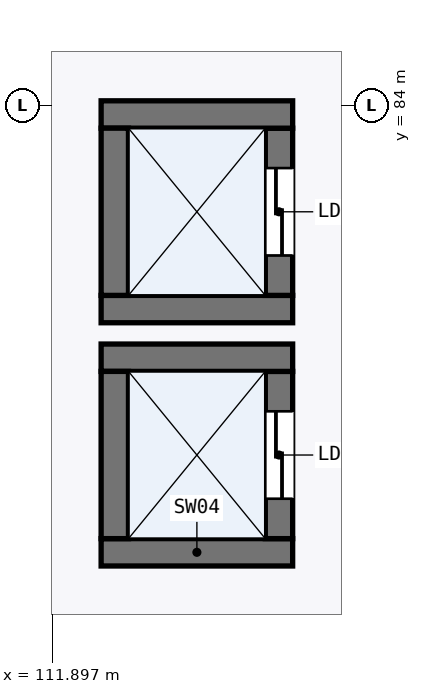
"""IFC4 building model, lengths in metres.
Left out: names, types, materials, properties, quantities, classifications, styles, units other than length and angle.
Written with IfcOpenShell. Run it as: python <this file> out.ifc"""

import sys

from ifc_helpers import new_model, si_unit, direction, frame, frame_2d, origin, place, context, subcontext, project, spatial, rectangle, extrude, element, fill, save


model = new_model("IFC4")
c1 = context("Model", 3, precision=1e-05, world=origin(), true_north=direction((0.0, 1.0)))
c2 = subcontext(c1, "Body", "Model", "MODEL_VIEW")
j1 = project(units=[si_unit("LENGTHUNIT", "METRE"), si_unit("PLANEANGLEUNIT", "RADIAN")], contexts=[c1])
p1 = place(None, origin())
s1 = spatial("IfcSite", under=j1, at=p1, CompositionType="ELEMENT")
p2 = place(p1, origin())
s2 = spatial("IfcBuilding", under=s1, at=p2, CompositionType="ELEMENT")
p3 = place(p2, frame((0.0, 0.0, 36.3)))
s3 = spatial("IfcBuildingStorey", under=s2, at=p3, CompositionType="ELEMENT", Elevation=36.3)
p4 = place(p3, frame((112.54, 78.12, 0.0), z_axis=(0.0, 0.0, 1.0), x_axis=(1.0, 0.0, 0.0)))
e1 = element("IfcWall", 1, at=p4, inside=s3, PredefinedType="SHEAR", context=c2, shape_type="SweptSolid", body=[
    extrude(rectangle(XDim=2.52, YDim=0.36, at=frame_2d((1.26, 0.0))), origin(), (0.0, 0.0, 1.0), 3.495),
])
p5 = place(p3, frame((114.88, 78.3, 0.0), z_axis=(0.0, 0.0, 1.0), x_axis=(0.0, 1.0, 0.0)))
e2 = element("IfcWall", 2, at=p5, inside=s3, PredefinedType="SHEAR", context=c2, shape_type="SweptSolid", body=[
    extrude(rectangle(XDim=2.2, YDim=0.36, at=frame_2d((1.1, 0.0))), origin(), (0.0, 0.0, 1.0), 3.495),
])
p6 = place(p5, frame((0.525, 0.0, 0.0)))
e3 = element("IfcOpeningElement", 3, at=p6, cuts=e2, PredefinedType="OPENING", context=c2, shape_type="SweptSolid", body=[
    extrude(rectangle(XDim=1.15, YDim=2.2, at=frame_2d((0.575, 1.1))), frame((0.0, 0.19, 0.0), z_axis=(0.0, -1.0, 0.0), x_axis=(1.0, 0.0, 0.0)), (0.0, 0.0, 1.0), 0.38),
])
p7 = place(p3, frame((115.06, 80.68, 0.0), z_axis=(0.0, 0.0, 1.0), x_axis=(-1.0, 0.0, 0.0)))
e4 = element("IfcWall", 4, at=p7, inside=s3, PredefinedType="SHEAR", context=c2, shape_type="SweptSolid", body=[
    extrude(rectangle(XDim=2.52, YDim=0.36, at=frame_2d((1.26, 0.0))), origin(), (0.0, 0.0, 1.0), 3.495),
])
p8 = place(p3, frame((112.72, 80.5, 0.0), z_axis=(0.0, 0.0, 1.0), x_axis=(0.0, -1.0, 0.0)))
e5 = element("IfcWall", 5, at=p8, inside=s3, PredefinedType="SHEAR", context=c2, shape_type="SweptSolid", body=[
    extrude(rectangle(XDim=2.2, YDim=0.36, at=frame_2d((1.1, 0.0))), origin(), (0.0, 0.0, 1.0), 3.495),
])
p9 = place(p3, frame((112.54, 81.32, 0.0), z_axis=(0.0, 0.0, 1.0), x_axis=(1.0, 0.0, 0.0)))
e6 = element("IfcWall", 6, at=p9, inside=s3, PredefinedType="SHEAR", context=c2, shape_type="SweptSolid", body=[
    extrude(rectangle(XDim=2.52, YDim=0.36, at=frame_2d((1.26, 0.0))), origin(), (0.0, 0.0, 1.0), 3.495),
])
p10 = place(p3, frame((114.88, 81.5, 0.0), z_axis=(0.0, 0.0, 1.0), x_axis=(0.0, 1.0, 0.0)))
e7 = element("IfcWall", 7, at=p10, inside=s3, PredefinedType="SHEAR", context=c2, shape_type="SweptSolid", body=[
    extrude(rectangle(XDim=2.2, YDim=0.36, at=frame_2d((1.1, 0.0))), origin(), (0.0, 0.0, 1.0), 3.495),
])
p11 = place(p10, frame((0.525, 0.0, 0.0)))
e8 = element("IfcOpeningElement", 8, at=p11, cuts=e7, PredefinedType="OPENING", context=c2, shape_type="SweptSolid", body=[
    extrude(rectangle(XDim=1.15, YDim=2.2, at=frame_2d((0.575, 1.1))), frame((0.0, 0.19, 0.0), z_axis=(0.0, -1.0, 0.0), x_axis=(1.0, 0.0, 0.0)), (0.0, 0.0, 1.0), 0.38),
])
p12 = place(p3, frame((115.06, 83.88, 0.0), z_axis=(0.0, 0.0, 1.0), x_axis=(-1.0, 0.0, 0.0)))
e9 = element("IfcWall", 9, at=p12, inside=s3, PredefinedType="SHEAR", context=c2, shape_type="SweptSolid", body=[
    extrude(rectangle(XDim=2.52, YDim=0.36, at=frame_2d((1.26, 0.0))), origin(), (0.0, 0.0, 1.0), 3.495),
])
p13 = place(p3, frame((112.72, 83.7, 0.0), z_axis=(0.0, 0.0, 1.0), x_axis=(0.0, -1.0, 0.0)))
e10 = element("IfcWall", 10, at=p13, inside=s3, PredefinedType="SHEAR", context=c2, shape_type="SweptSolid", body=[
    extrude(rectangle(XDim=2.2, YDim=0.36, at=frame_2d((1.1, 0.0))), origin(), (0.0, 0.0, 1.0), 3.495),
])
p14 = place(p6, frame((1.15, 0.0, 0.0), z_axis=(0.0, 0.0, 1.0), x_axis=(-1.0, 0.0, 0.0)))
e11 = element("IfcDoor", 11, at=p14, inside=s3, OperationType="DOUBLE_DOOR_SLIDING", PredefinedType="DOOR", context=c2, shape_type="SweptSolid", body=[
    extrude(rectangle(XDim=1.15, YDim=2.2, at=frame_2d((0.575, 1.1))), frame((0.0, 0.025, 0.0), z_axis=(0.0, -1.0, 0.0), x_axis=(1.0, 0.0, 0.0)), (0.0, 0.0, 1.0), 0.05),
])
fill(e3, e11)
p15 = place(p11, frame((1.15, 0.0, 0.0), z_axis=(0.0, 0.0, 1.0), x_axis=(-1.0, 0.0, 0.0)))
e12 = element("IfcDoor", 12, at=p15, inside=s3, OperationType="DOUBLE_DOOR_SLIDING", PredefinedType="DOOR", context=c2, shape_type="SweptSolid", body=[
    extrude(rectangle(XDim=1.15, YDim=2.2, at=frame_2d((0.575, 1.1))), frame((0.0, 0.025, 0.0), z_axis=(0.0, -1.0, 0.0), x_axis=(1.0, 0.0, 0.0)), (0.0, 0.0, 1.0), 0.05),
])
fill(e8, e12)
save(model, sys.argv[1])
